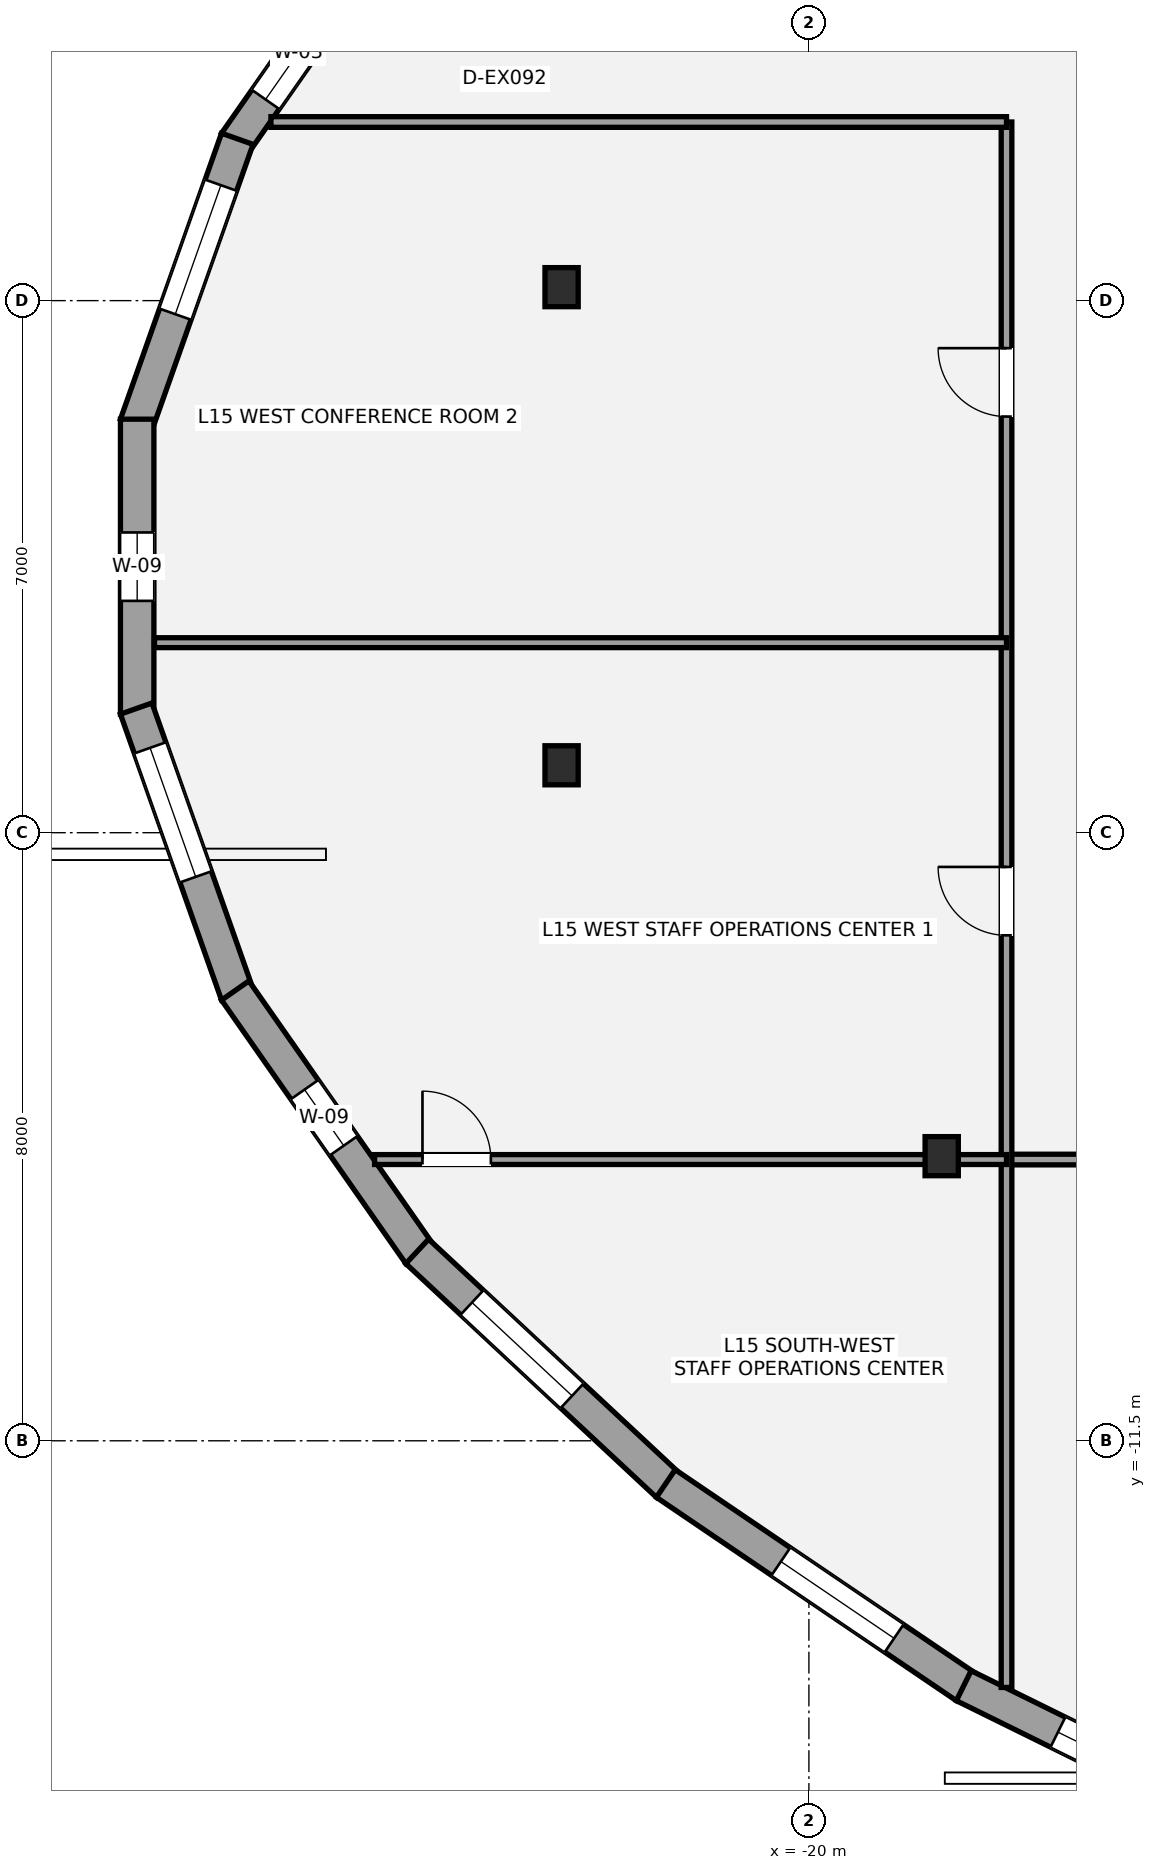
"""IFC4 building model, lengths in metres.
Left out: names, types, materials, properties, quantities, classifications, styles, units other than length and angle.
Written with IfcOpenShell. Run it as: python <this file> out.ifc"""

import sys

from ifc_helpers import new_model, si_unit, direction, frame, frame_2d, origin, origin_2d, place, context, subcontext, project, spatial, rectangle, i_section, extrude, element, fill, save


model = new_model("IFC4")
c1 = context("Model", 3, precision=1e-05, world=origin(), true_north=direction((0.0, 1.0)))
c2 = subcontext(c1, "Body", "Model", "MODEL_VIEW")
j1 = project(units=[si_unit("LENGTHUNIT", "METRE"), si_unit("PLANEANGLEUNIT", "RADIAN")], contexts=[c1])
p1 = place(None, origin())
s1 = spatial("IfcSite", under=j1, at=p1, CompositionType="ELEMENT")
p2 = place(p1, origin())
s2 = spatial("IfcBuilding", under=s1, at=p2, CompositionType="ELEMENT")
p3 = place(p2, frame((0.0, 0.0, 59.4)))
s3 = spatial("IfcBuildingStorey", under=s2, at=p3, CompositionType="ELEMENT", Elevation=59.4)
for number, where, z_axis, x_axis in (
    (1, (-23.254, 3.677, 0.0), (0.0, 0.0, 1.0), (1.0, 0.0, 0.0)),
    (2, (-23.254, -2.613, 0.0), (0.0, 0.0, 1.0), (1.0, 0.0, 0.0)),
    (3, (-18.253, -7.756, 0.0), (0.0, 0.0, 1.0), (1.0, 0.0, 0.0)),
):
    element("IfcColumn", number, at=place(p3, frame(where, z_axis=z_axis, x_axis=x_axis)), inside=s3, PredefinedType="COLUMN", context=c2, shape_type="SweptSolid", body=[
        extrude(i_section(OverallWidth=0.437, OverallDepth=0.514, WebThickness=0.061, FlangeThickness=0.097, at=origin_2d()), origin(), (0.0, 0.0, 1.0), 3.6),
    ])
p4 = place(p3, frame((-27.548, 5.576, 0.0), z_axis=(0.0, 0.0, 1.0), x_axis=(0.573152463572, 0.819448749771, 0.0)))
e4 = element("IfcWall", 4, at=p4, inside=s3, PredefinedType="STANDARD", context=c2, shape_type="SweptSolid", body=[
    extrude(rectangle(XDim=4.231, YDim=0.44, at=frame_2d((2.115, 0.0))), origin(), (0.0, 0.0, 1.0), 2.529),
])
p5 = place(p4, frame((0.696, 0.0, 0.65)))
e5 = element("IfcOpeningElement", 5, at=p5, cuts=e4, PredefinedType="OPENING", context=c2, shape_type="SweptSolid", body=[
    extrude(rectangle(XDim=1.5, YDim=1.7, at=frame_2d((0.75, 0.85))), frame((0.0, 0.23, 0.0), z_axis=(0.0, -1.0, 0.0), x_axis=(1.0, 0.0, 0.0)), (0.0, 0.0, 1.0), 0.46),
])
p6 = place(p3, frame((-28.851, 1.867, 0.0), z_axis=(0.0, 0.0, 1.0), x_axis=(0.333264929682, 0.942833223133, 0.0)))
e6 = element("IfcWall", 6, at=p6, inside=s3, PredefinedType="STANDARD", context=c2, shape_type="SweptSolid", body=[
    extrude(rectangle(XDim=3.99, YDim=0.44, at=frame_2d((1.995, 0.0))), origin(), (0.0, 0.0, 1.0), 2.533),
])
p7 = place(p6, frame((1.543, 0.0, 0.65)))
e7 = element("IfcOpeningElement", 7, at=p7, cuts=e6, PredefinedType="OPENING", context=c2, shape_type="SweptSolid", body=[
    extrude(rectangle(XDim=1.8, YDim=1.7, at=frame_2d((0.9, 0.85))), frame((0.0, 0.23, 0.0), z_axis=(0.0, -1.0, 0.0), x_axis=(1.0, 0.0, 0.0)), (0.0, 0.0, 1.0), 0.46),
])
p8 = place(p3, frame((-28.838, -1.94, 0.0), z_axis=(0.0, 0.0, 1.0), x_axis=(0.0, 1.0, 0.0)))
e8 = element("IfcWall", 8, at=p8, inside=s3, PredefinedType="STANDARD", context=c2, shape_type="SweptSolid", body=[
    extrude(rectangle(XDim=3.88, YDim=0.44, at=frame_2d((1.94, 0.0))), origin(), (0.0, 0.0, 1.0), 2.533),
])
p9 = place(p8, frame((1.49, 0.0, 0.58)))
e9 = element("IfcOpeningElement", 9, at=p9, cuts=e8, PredefinedType="OPENING", context=c2, shape_type="SweptSolid", body=[
    extrude(rectangle(XDim=0.9, YDim=1.35, at=frame_2d((0.45, 0.675))), frame((0.0, 0.23, 0.0), z_axis=(0.0, -1.0, 0.0), x_axis=(1.0, 0.0, 0.0)), (0.0, 0.0, 1.0), 0.46),
])
p10 = place(p3, frame((-27.521, -5.629, 0.0), z_axis=(0.0, 0.0, 1.0), x_axis=(-0.333264929682, 0.942833223133, 0.0)))
e10 = element("IfcWall", 10, at=p10, inside=s3, PredefinedType="STANDARD", context=c2, shape_type="SweptSolid", body=[
    extrude(rectangle(XDim=3.99, YDim=0.44, at=frame_2d((1.995, 0.0))), origin(), (0.0, 0.0, 1.0), 2.533),
])
p11 = place(p10, frame((1.642, 0.0, 0.65)))
e11 = element("IfcOpeningElement", 11, at=p11, cuts=e10, PredefinedType="OPENING", context=c2, shape_type="SweptSolid", body=[
    extrude(rectangle(XDim=1.8, YDim=1.7, at=frame_2d((0.9, 0.85))), frame((0.0, 0.23, 0.0), z_axis=(0.0, -1.0, 0.0), x_axis=(1.0, 0.0, 0.0)), (0.0, 0.0, 1.0), 0.46),
])
p12 = place(p3, frame((-25.123, -9.043, 0.0), z_axis=(0.0, 0.0, 1.0), x_axis=(-0.573152463572, 0.819448749771, 0.0)))
e12 = element("IfcWall", 12, at=p12, inside=s3, PredefinedType="STANDARD", context=c2, shape_type="SweptSolid", body=[
    extrude(rectangle(XDim=4.231, YDim=0.44, at=frame_2d((2.115, 0.0))), origin(), (0.0, 0.0, 1.0), 2.529),
])
p13 = place(p12, frame((1.74, 0.0, 0.58)))
e13 = element("IfcOpeningElement", 13, at=p13, cuts=e12, PredefinedType="OPENING", context=c2, shape_type="SweptSolid", body=[
    extrude(rectangle(XDim=0.9, YDim=1.35, at=frame_2d((0.45, 0.675))), frame((0.0, 0.23, 0.0), z_axis=(0.0, -1.0, 0.0), x_axis=(1.0, 0.0, 0.0)), (0.0, 0.0, 1.0), 0.46),
])
p14 = place(p3, frame((-21.856, -12.083, 0.0), z_axis=(0.0, 0.0, 1.0), x_axis=(-0.731343335822, 0.682009475849, 0.0)))
e14 = element("IfcWall", 14, at=p14, inside=s3, PredefinedType="STANDARD", context=c2, shape_type="SweptSolid", body=[
    extrude(rectangle(XDim=4.508, YDim=0.44, at=frame_2d((2.254, 0.0))), origin(), (0.0, 0.0, 1.0), 2.529),
])
p15 = place(p14, frame((1.722, 0.0, 0.65)))
e15 = element("IfcOpeningElement", 15, at=p15, cuts=e14, PredefinedType="OPENING", context=c2, shape_type="SweptSolid", body=[
    extrude(rectangle(XDim=1.8, YDim=1.7, at=frame_2d((0.9, 0.85))), frame((0.0, 0.23, 0.0), z_axis=(0.0, -1.0, 0.0), x_axis=(1.0, 0.0, 0.0)), (0.0, 0.0, 1.0), 0.46),
])
p16 = place(p3, frame((-17.937, -14.737, 0.0), z_axis=(0.0, 0.0, 1.0), x_axis=(-0.827723816917, 0.561135708103, 0.0)))
e16 = element("IfcWall", 16, at=p16, inside=s3, PredefinedType="STANDARD", context=c2, shape_type="SweptSolid", body=[
    extrude(rectangle(XDim=4.768, YDim=0.44, at=frame_2d((2.384, 0.0))), origin(), (0.0, 0.0, 1.0), 2.529),
])
p17 = place(p16, frame((1.138, 0.0, 0.65)))
e17 = element("IfcOpeningElement", 17, at=p17, cuts=e16, PredefinedType="OPENING", context=c2, shape_type="SweptSolid", body=[
    extrude(rectangle(XDim=1.8, YDim=1.7, at=frame_2d((0.9, 0.85))), frame((0.0, 0.23, 0.0), z_axis=(0.0, -1.0, 0.0), x_axis=(1.0, 0.0, 0.0)), (0.0, 0.0, 1.0), 0.46),
])
p18 = place(p3, frame((-13.428, -16.958, 0.0), z_axis=(0.0, 0.0, 1.0), x_axis=(-0.896962161347, 0.442107318545, 0.0)))
e18 = element("IfcWall", 18, at=p18, inside=s3, PredefinedType="STANDARD", context=c2, shape_type="SweptSolid", body=[
    extrude(rectangle(XDim=5.056, YDim=0.44, at=frame_2d((2.528, 0.0))), origin(), (0.0, 0.0, 1.0), 2.529),
])
p19 = place(p18, frame((1.874, 0.0, 0.65)))
e19 = element("IfcOpeningElement", 19, at=p19, cuts=e18, PredefinedType="OPENING", context=c2, shape_type="SweptSolid", body=[
    extrude(rectangle(XDim=1.8, YDim=1.7, at=frame_2d((0.9, 0.85))), frame((0.0, 0.23, 0.0), z_axis=(0.0, -1.0, 0.0), x_axis=(1.0, 0.0, 0.0)), (0.0, 0.0, 1.0), 0.46),
])
p20 = place(p3, frame((-17.4, -7.8, 0.0), z_axis=(0.0, 0.0, 1.0), x_axis=(1.0, 0.0, 0.0)))
e20 = element("IfcWall", 20, at=p20, inside=s3, PredefinedType="PARTITIONING", context=c2, shape_type="SweptSolid", body=[
    extrude(rectangle(XDim=34.8, YDim=0.14, at=frame_2d((17.4, 0.0))), origin(), (0.0, 0.0, 1.0), 2.779),
])
p21 = place(p20, frame((3.5, 0.0, 0.0)))
e21 = element("IfcOpeningElement", 21, at=p21, cuts=e20, PredefinedType="OPENING", context=c2, shape_type="SweptSolid", body=[
    extrude(rectangle(XDim=0.9, YDim=2.1, at=frame_2d((0.45, 1.05))), frame((0.0, 0.08, 0.0), z_axis=(0.0, -1.0, 0.0), x_axis=(1.0, 0.0, 0.0)), (0.0, 0.0, 1.0), 0.16),
])
p22 = place(p20, frame((10.95, 0.0, 0.0)))
e22 = element("IfcOpeningElement", 22, at=p22, cuts=e20, PredefinedType="OPENING", context=c2, shape_type="SweptSolid", body=[
    extrude(rectangle(XDim=0.9, YDim=2.1, at=frame_2d((0.45, 1.05))), frame((0.0, 0.08, 0.0), z_axis=(0.0, -1.0, 0.0), x_axis=(1.0, 0.0, 0.0)), (0.0, 0.0, 1.0), 0.16),
])
p23 = place(p20, frame((17.95, 0.0, 0.0)))
e23 = element("IfcOpeningElement", 23, at=p23, cuts=e20, PredefinedType="OPENING", context=c2, shape_type="SweptSolid", body=[
    extrude(rectangle(XDim=0.9, YDim=2.1, at=frame_2d((0.45, 1.05))), frame((0.0, 0.08, 0.0), z_axis=(0.0, -1.0, 0.0), x_axis=(1.0, 0.0, 0.0)), (0.0, 0.0, 1.0), 0.16),
])
p24 = place(p20, frame((24.45, 0.0, 0.0)))
e24 = element("IfcOpeningElement", 24, at=p24, cuts=e20, PredefinedType="OPENING", context=c2, shape_type="SweptSolid", body=[
    extrude(rectangle(XDim=0.9, YDim=2.1, at=frame_2d((0.45, 1.05))), frame((0.0, 0.08, 0.0), z_axis=(0.0, -1.0, 0.0), x_axis=(1.0, 0.0, 0.0)), (0.0, 0.0, 1.0), 0.16),
])
p25 = place(p20, frame((30.9, 0.0, 0.0)))
e25 = element("IfcOpeningElement", 25, at=p25, cuts=e20, PredefinedType="OPENING", context=c2, shape_type="SweptSolid", body=[
    extrude(rectangle(XDim=0.9, YDim=2.1, at=frame_2d((0.45, 1.05))), frame((0.0, 0.08, 0.0), z_axis=(0.0, -1.0, 0.0), x_axis=(1.0, 0.0, 0.0)), (0.0, 0.0, 1.0), 0.16),
])
p26 = place(p3, frame((-17.4, -14.745, 0.0), z_axis=(0.0, 0.0, 1.0), x_axis=(0.0, 1.0, 0.0)))
e26 = element("IfcWall", 26, at=p26, inside=s3, PredefinedType="PARTITIONING", context=c2, shape_type="SweptSolid", body=[
    extrude(rectangle(XDim=20.595, YDim=0.14, at=frame_2d((10.298, 0.0))), origin(), (0.0, 0.0, 1.0), 2.841),
])
p27 = place(p26, frame((9.895, 0.0, 0.0)))
e27 = element("IfcOpeningElement", 27, at=p27, cuts=e26, PredefinedType="OPENING", context=c2, shape_type="SweptSolid", body=[
    extrude(rectangle(XDim=0.9, YDim=2.1, at=frame_2d((0.45, 1.05))), frame((0.0, 0.08, 0.0), z_axis=(0.0, -1.0, 0.0), x_axis=(1.0, 0.0, 0.0)), (0.0, 0.0, 1.0), 0.16),
])
p28 = place(p26, frame((16.72, 0.0, 0.0)))
e28 = element("IfcOpeningElement", 28, at=p28, cuts=e26, PredefinedType="OPENING", context=c2, shape_type="SweptSolid", body=[
    extrude(rectangle(XDim=0.9, YDim=2.1, at=frame_2d((0.45, 1.05))), frame((0.0, 0.08, 0.0), z_axis=(0.0, -1.0, 0.0), x_axis=(1.0, 0.0, 0.0)), (0.0, 0.0, 1.0), 0.16),
])
p29 = place(p3, frame((-27.078, 5.85, 0.0), z_axis=(0.0, 0.0, 1.0), x_axis=(1.0, 0.0, 0.0)))
e29 = element("IfcWall", 29, at=p29, inside=s3, PredefinedType="PARTITIONING", context=c2, shape_type="SweptSolid", body=[
    extrude(rectangle(XDim=9.678, YDim=0.14, at=frame_2d((4.839, 0.0))), origin(), (0.0, 0.0, 1.0), 3.4),
])
p30 = place(p3, frame((-25.714, -7.8, 0.0), z_axis=(0.0, 0.0, 1.0), x_axis=(1.0, 0.0, 0.0)))
e30 = element("IfcWall", 30, at=p30, inside=s3, PredefinedType="PARTITIONING", context=c2, shape_type="SweptSolid", body=[
    extrude(rectangle(XDim=8.314, YDim=0.13, at=frame_2d((4.157, 0.0))), origin(), (0.0, 0.0, 1.0), 2.779),
])
p31 = place(p30, frame((0.63, 0.0, 0.0)))
e31 = element("IfcOpeningElement", 31, at=p31, cuts=e30, PredefinedType="OPENING", context=c2, shape_type="SweptSolid", body=[
    extrude(rectangle(XDim=0.9, YDim=2.1, at=frame_2d((0.45, 1.05))), frame((0.0, 0.075, 0.0), z_axis=(0.0, -1.0, 0.0), x_axis=(1.0, 0.0, 0.0)), (0.0, 0.0, 1.0), 0.15),
])
p32 = place(p3, frame((-28.61, -1.0, 0.0), z_axis=(0.0, 0.0, 1.0), x_axis=(1.0, 0.0, 0.0)))
e32 = element("IfcWall", 32, at=p32, inside=s3, PredefinedType="PARTITIONING", context=c2, shape_type="SweptSolid", body=[
    extrude(rectangle(XDim=11.21, YDim=0.13, at=frame_2d((5.605, 0.0))), origin(), (0.0, 0.0, 1.0), 2.841),
])
p33 = place(p5, origin())
e33 = element("IfcWindow", 33, at=p33, inside=s3, PartitioningType="SINGLE_PANEL", PredefinedType="WINDOW", context=c2, shape_type="SweptSolid", body=[
    extrude(rectangle(XDim=1.5, YDim=1.7, at=frame_2d((0.75, 0.85))), frame((0.0, -0.01, 0.0), z_axis=(0.0, -1.0, 0.0), x_axis=(1.0, 0.0, 0.0)), (0.0, 0.0, 1.0), 0.06),
])
fill(e5, e33)
p34 = place(p7, origin())
e34 = element("IfcWindow", 34, at=p34, inside=s3, PartitioningType="SINGLE_PANEL", PredefinedType="WINDOW", context=c2, shape_type="SweptSolid", body=[
    extrude(rectangle(XDim=1.8, YDim=1.7, at=frame_2d((0.9, 0.85))), frame((0.0, -0.01, 0.0), z_axis=(0.0, -1.0, 0.0), x_axis=(1.0, 0.0, 0.0)), (0.0, 0.0, 1.0), 0.06),
])
fill(e7, e34)
p35 = place(p9, origin())
e35 = element("IfcWindow", 35, at=p35, inside=s3, PartitioningType="SINGLE_PANEL", PredefinedType="WINDOW", context=c2, shape_type="SweptSolid", body=[
    extrude(rectangle(XDim=0.9, YDim=1.35, at=frame_2d((0.45, 0.675))), frame((0.0, -0.01, 0.0), z_axis=(0.0, -1.0, 0.0), x_axis=(1.0, 0.0, 0.0)), (0.0, 0.0, 1.0), 0.06),
])
fill(e9, e35)
p36 = place(p11, origin())
e36 = element("IfcWindow", 36, at=p36, inside=s3, PartitioningType="SINGLE_PANEL", PredefinedType="WINDOW", context=c2, shape_type="SweptSolid", body=[
    extrude(rectangle(XDim=1.8, YDim=1.7, at=frame_2d((0.9, 0.85))), frame((0.0, -0.01, 0.0), z_axis=(0.0, -1.0, 0.0), x_axis=(1.0, 0.0, 0.0)), (0.0, 0.0, 1.0), 0.06),
])
fill(e11, e36)
p37 = place(p13, origin())
e37 = element("IfcWindow", 37, at=p37, inside=s3, PartitioningType="SINGLE_PANEL", PredefinedType="WINDOW", context=c2, shape_type="SweptSolid", body=[
    extrude(rectangle(XDim=0.9, YDim=1.35, at=frame_2d((0.45, 0.675))), frame((0.0, -0.01, 0.0), z_axis=(0.0, -1.0, 0.0), x_axis=(1.0, 0.0, 0.0)), (0.0, 0.0, 1.0), 0.06),
])
fill(e13, e37)
p38 = place(p15, origin())
e38 = element("IfcWindow", 38, at=p38, inside=s3, PartitioningType="SINGLE_PANEL", PredefinedType="WINDOW", context=c2, shape_type="SweptSolid", body=[
    extrude(rectangle(XDim=1.8, YDim=1.7, at=frame_2d((0.9, 0.85))), frame((0.0, -0.01, 0.0), z_axis=(0.0, -1.0, 0.0), x_axis=(1.0, 0.0, 0.0)), (0.0, 0.0, 1.0), 0.06),
])
fill(e15, e38)
p39 = place(p17, origin())
e39 = element("IfcWindow", 39, at=p39, inside=s3, PartitioningType="SINGLE_PANEL", PredefinedType="WINDOW", context=c2, shape_type="SweptSolid", body=[
    extrude(rectangle(XDim=1.8, YDim=1.7, at=frame_2d((0.9, 0.85))), frame((0.0, -0.01, 0.0), z_axis=(0.0, -1.0, 0.0), x_axis=(1.0, 0.0, 0.0)), (0.0, 0.0, 1.0), 0.06),
])
fill(e17, e39)
p40 = place(p19, origin())
e40 = element("IfcWindow", 40, at=p40, inside=s3, PartitioningType="SINGLE_PANEL", PredefinedType="WINDOW", context=c2, shape_type="SweptSolid", body=[
    extrude(rectangle(XDim=1.8, YDim=1.7, at=frame_2d((0.9, 0.85))), frame((0.0, -0.01, 0.0), z_axis=(0.0, -1.0, 0.0), x_axis=(1.0, 0.0, 0.0)), (0.0, 0.0, 1.0), 0.06),
])
fill(e19, e40)
p41 = place(p31, origin())
e41 = element("IfcDoor", 41, at=p41, inside=s3, OperationType="SINGLE_SWING_LEFT", PredefinedType="DOOR", context=c2, shape_type="SweptSolid", body=[
    extrude(rectangle(XDim=0.9, YDim=2.1, at=frame_2d((0.45, 1.05))), frame((0.0, 0.025, 0.0), z_axis=(0.0, -1.0, 0.0), x_axis=(1.0, 0.0, 0.0)), (0.0, 0.0, 1.0), 0.05),
])
fill(e31, e41)
p42 = place(p27, origin())
e42 = element("IfcDoor", 42, at=p42, inside=s3, OperationType="SINGLE_SWING_RIGHT", PredefinedType="DOOR", context=c2, shape_type="SweptSolid", body=[
    extrude(rectangle(XDim=0.9, YDim=2.1, at=frame_2d((0.45, 1.05))), frame((0.0, 0.025, 0.0), z_axis=(0.0, -1.0, 0.0), x_axis=(1.0, 0.0, 0.0)), (0.0, 0.0, 1.0), 0.05),
])
fill(e27, e42)
p43 = place(p28, origin())
e43 = element("IfcDoor", 43, at=p43, inside=s3, OperationType="SINGLE_SWING_RIGHT", PredefinedType="DOOR", context=c2, shape_type="SweptSolid", body=[
    extrude(rectangle(XDim=0.9, YDim=2.1, at=frame_2d((0.45, 1.05))), frame((0.0, 0.025, 0.0), z_axis=(0.0, -1.0, 0.0), x_axis=(1.0, 0.0, 0.0)), (0.0, 0.0, 1.0), 0.05),
])
fill(e28, e43)
save(model, sys.argv[1])
